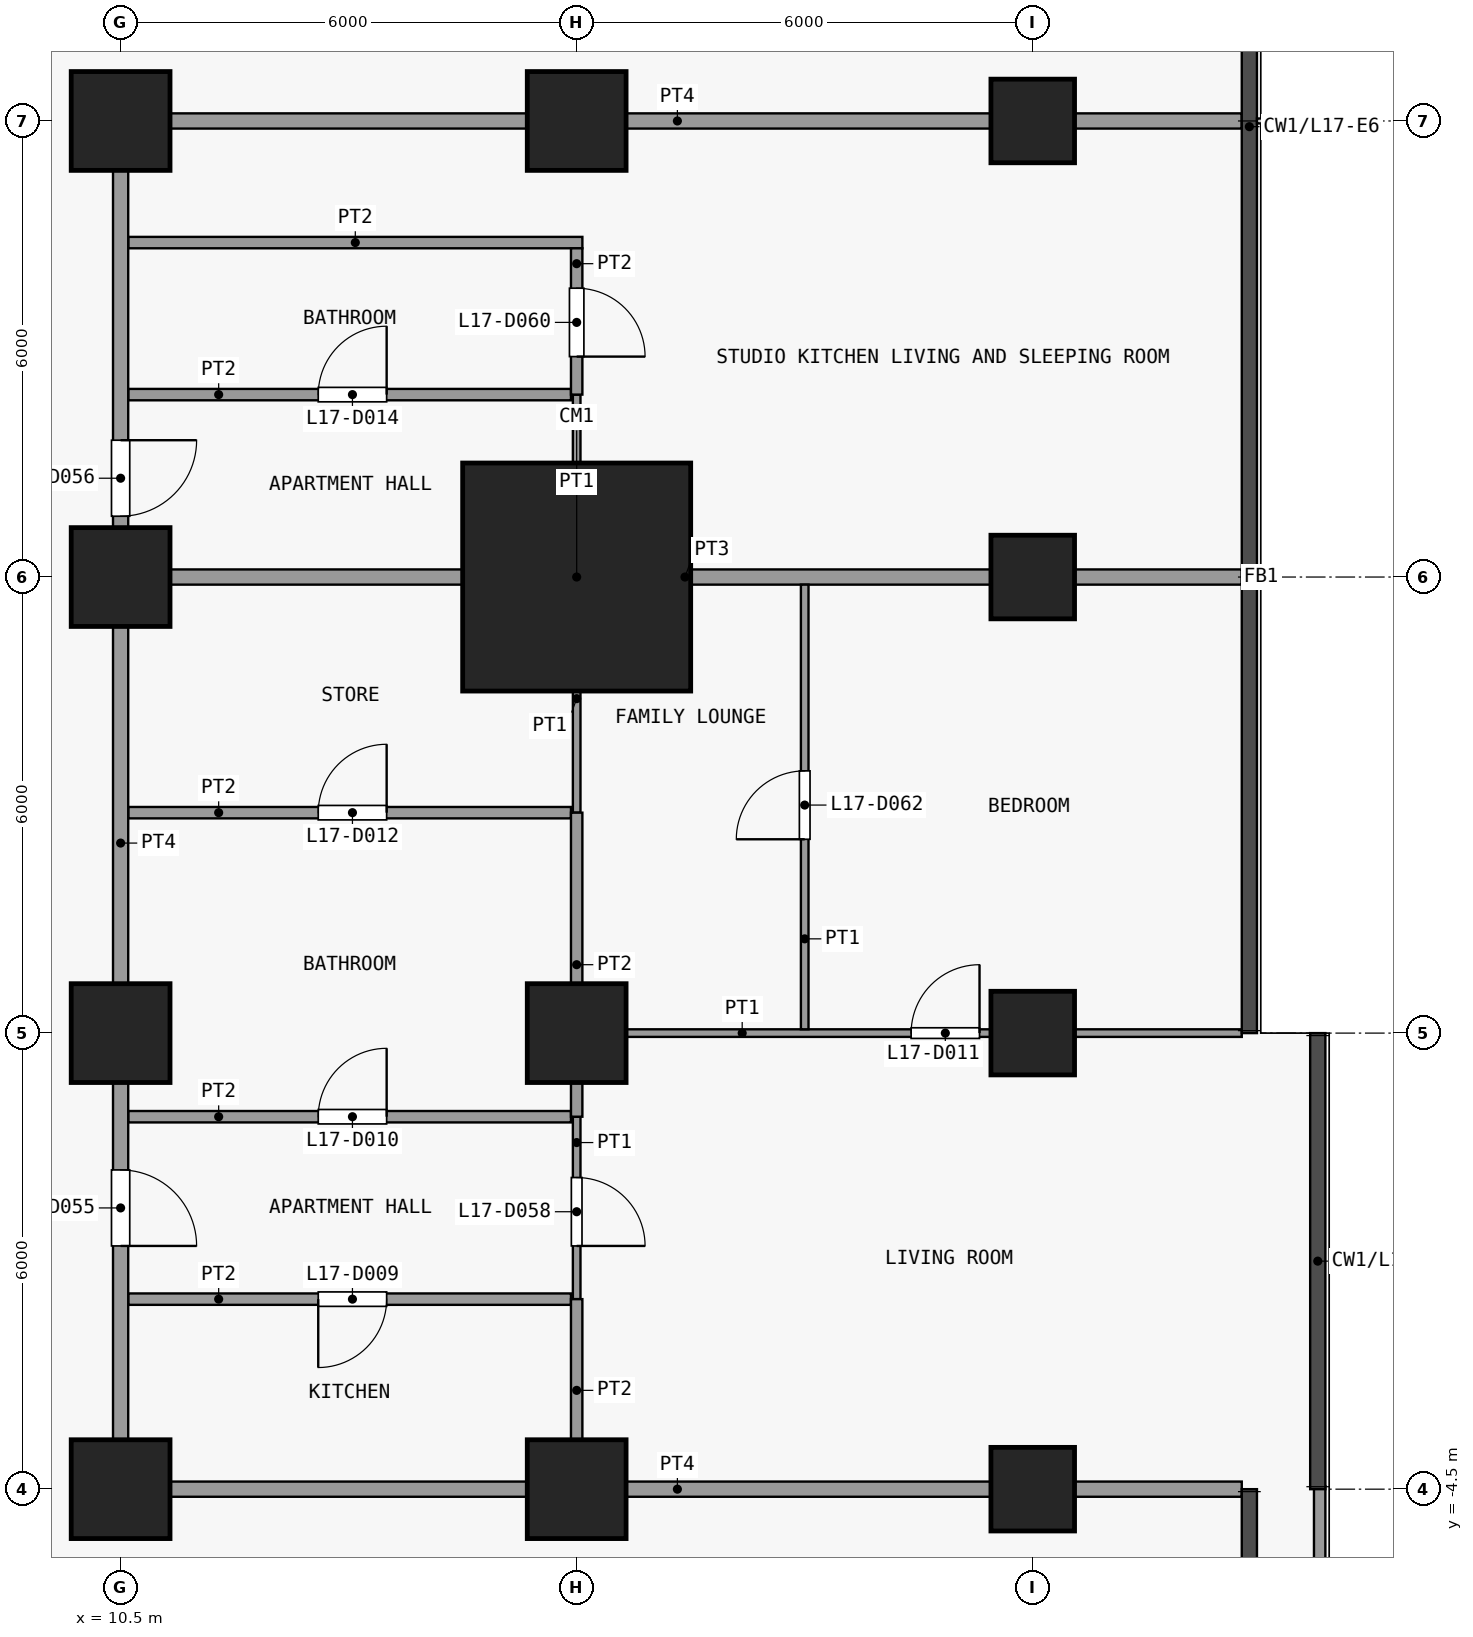
"""IFC4 building model, lengths in metres.
Left out: names, types, materials, properties, quantities, classifications, styles, units other than length and angle.
Written with IfcOpenShell. Run it as: python <this file> out.ifc"""

import sys

from ifc_helpers import new_model, si_unit, direction, frame, frame_2d, origin, origin_2d, place, context, subcontext, project, spatial, rectangle, extrude, element, fill, save


model = new_model("IFC4")
c1 = context("Model", 3, precision=1e-05, world=origin(), true_north=direction((0.0, 1.0)))
c2 = subcontext(c1, "Body", "Model", "MODEL_VIEW")
j1 = project(units=[si_unit("LENGTHUNIT", "METRE"), si_unit("PLANEANGLEUNIT", "RADIAN")], contexts=[c1])
p1 = place(None, origin())
s1 = spatial("IfcSite", under=j1, at=p1, CompositionType="ELEMENT")
p2 = place(p1, origin())
s2 = spatial("IfcBuilding", under=s1, at=p2, CompositionType="ELEMENT")
p3 = place(p2, frame((0.0, 0.0, 72.1)))
s3 = spatial("IfcBuildingStorey", under=s2, at=p3, CompositionType="ELEMENT", Elevation=72.1)
for number, where, z_axis, x_axis in (
    (1, (10.5, -4.5, 0.0), (0.0, 0.0, 1.0), (1.0, 0.0, 0.0)),
    (2, (10.5, 1.5, 0.0), (0.0, 0.0, 1.0), (1.0, 0.0, 0.0)),
    (3, (10.5, 7.5, 0.0), (0.0, 0.0, 1.0), (1.0, 0.0, 0.0)),
    (4, (10.5, 13.5, 0.0), (0.0, 0.0, 1.0), (1.0, 0.0, 0.0)),
    (5, (16.5, -4.5, 0.0), (0.0, 0.0, 1.0), (1.0, 0.0, 0.0)),
    (6, (16.5, 1.5, 0.0), (0.0, 0.0, 1.0), (1.0, 0.0, 0.0)),
):
    element("IfcColumn", number, at=place(p3, frame(where, z_axis=z_axis, x_axis=x_axis)), inside=s3, PredefinedType="COLUMN", context=c2, shape_type="SweptSolid", body=[
        extrude(rectangle(XDim=1.3, YDim=1.3, at=origin_2d()), origin(), (0.0, 0.0, 1.0), 3.6),
    ])
p4 = place(p3, frame((16.5, 7.5, 0.0), z_axis=(0.0, 0.0, 1.0), x_axis=(1.0, 0.0, 0.0)))
e7 = element("IfcColumn", 7, at=p4, inside=s3, PredefinedType="COLUMN", context=c2, shape_type="SweptSolid", body=[
    extrude(rectangle(XDim=3.0, YDim=3.0, at=origin_2d()), origin(), (0.0, 0.0, 1.0), 3.6),
])
p5 = place(p3, frame((16.5, 13.5, 0.0), z_axis=(0.0, 0.0, 1.0), x_axis=(1.0, 0.0, 0.0)))
e8 = element("IfcColumn", 8, at=p5, inside=s3, PredefinedType="COLUMN", context=c2, shape_type="SweptSolid", body=[
    extrude(rectangle(XDim=1.3, YDim=1.3, at=origin_2d()), origin(), (0.0, 0.0, 1.0), 3.6),
])
for number, where, z_axis, x_axis in (
    (9, (22.5, -4.5, 0.0), (0.0, 0.0, 1.0), (1.0, 0.0, 0.0)),
    (10, (22.5, 1.5, 0.0), (0.0, 0.0, 1.0), (1.0, 0.0, 0.0)),
    (11, (22.5, 7.5, 0.0), (0.0, 0.0, 1.0), (1.0, 0.0, 0.0)),
    (12, (22.5, 13.5, 0.0), (0.0, 0.0, 1.0), (1.0, 0.0, 0.0)),
):
    element("IfcColumn", number, at=place(p3, frame(where, z_axis=z_axis, x_axis=x_axis)), inside=s3, PredefinedType="COLUMN", context=c2, shape_type="SweptSolid", body=[
        extrude(rectangle(XDim=1.1, YDim=1.1, at=origin_2d()), origin(), (0.0, 0.0, 1.0), 3.6),
    ])
p6 = place(p3, frame((26.275, -4.46, 0.0), z_axis=(0.0, 0.0, 1.0), x_axis=(0.0, -1.0, 0.0)))
e13 = element("IfcWall", 13, at=p6, inside=s3, PredefinedType="PARAPET", context=c2, shape_type="SweptSolid", body=[
    extrude(rectangle(XDim=8.99, YDim=0.15, at=frame_2d((4.495, 0.0))), origin(), (0.0, 0.0, 1.0), 1.15),
])
p7 = place(p3, frame((10.4, -4.5, 0.0), z_axis=(0.0, 0.0, 1.0), x_axis=(1.0, 0.0, 0.0)))
e14 = element("IfcWall", 14, at=p7, inside=s3, PredefinedType="PARTITIONING", context=c2, shape_type="SweptSolid", body=[
    extrude(rectangle(XDim=14.85, YDim=0.2, at=frame_2d((7.425, 0.0))), origin(), (0.0, 0.0, 1.0), 3.15),
])
p8 = place(p3, frame((10.6, -2.0, 0.0), z_axis=(0.0, 0.0, 1.0), x_axis=(1.0, 0.0, 0.0)))
e15 = element("IfcWall", 15, at=p8, inside=s3, PredefinedType="PARTITIONING", context=c2, shape_type="SweptSolid", body=[
    extrude(rectangle(XDim=5.825, YDim=0.15, at=frame_2d((2.913, 0.0))), origin(), (0.0, 0.0, 1.0), 3.15),
])
p9 = place(p8, frame((2.5, 0.0, 0.0)))
e16 = element("IfcOpeningElement", 16, at=p9, cuts=e15, PredefinedType="OPENING", context=c2, shape_type="SweptSolid", body=[
    extrude(rectangle(XDim=0.9, YDim=2.1, at=frame_2d((0.45, 1.05))), frame((0.0, 0.085, 0.0), z_axis=(0.0, -1.0, 0.0), x_axis=(1.0, 0.0, 0.0)), (0.0, 0.0, 1.0), 0.17),
])
p10 = place(p3, frame((10.6, 0.4, 0.0), z_axis=(0.0, 0.0, 1.0), x_axis=(1.0, 0.0, 0.0)))
e17 = element("IfcWall", 17, at=p10, inside=s3, PredefinedType="PARTITIONING", context=c2, shape_type="SweptSolid", body=[
    extrude(rectangle(XDim=5.825, YDim=0.15, at=frame_2d((2.913, 0.0))), origin(), (0.0, 0.0, 1.0), 3.15),
])
p11 = place(p10, frame((2.5, 0.0, 0.0)))
e18 = element("IfcOpeningElement", 18, at=p11, cuts=e17, PredefinedType="OPENING", context=c2, shape_type="SweptSolid", body=[
    extrude(rectangle(XDim=0.9, YDim=2.1, at=frame_2d((0.45, 1.05))), frame((0.0, 0.085, 0.0), z_axis=(0.0, -1.0, 0.0), x_axis=(1.0, 0.0, 0.0)), (0.0, 0.0, 1.0), 0.17),
])
p12 = place(p3, frame((16.575, 1.5, 0.0), z_axis=(0.0, 0.0, 1.0), x_axis=(1.0, 0.0, 0.0)))
e19 = element("IfcWall", 19, at=p12, inside=s3, PredefinedType="PARTITIONING", context=c2, shape_type="SweptSolid", body=[
    extrude(rectangle(XDim=8.675, YDim=0.1, at=frame_2d((4.337, 0.0))), origin(), (0.0, 0.0, 1.0), 3.15),
])
p13 = place(p12, frame((4.325, 0.0, 0.0)))
e20 = element("IfcOpeningElement", 20, at=p13, cuts=e19, PredefinedType="OPENING", context=c2, shape_type="SweptSolid", body=[
    extrude(rectangle(XDim=0.9, YDim=2.1, at=frame_2d((0.45, 1.05))), frame((0.0, 0.06, 0.0), z_axis=(0.0, -1.0, 0.0), x_axis=(1.0, 0.0, 0.0)), (0.0, 0.0, 1.0), 0.12),
])
p14 = place(p3, frame((10.6, 4.4, 0.0), z_axis=(0.0, 0.0, 1.0), x_axis=(1.0, 0.0, 0.0)))
e21 = element("IfcWall", 21, at=p14, inside=s3, PredefinedType="PARTITIONING", context=c2, shape_type="SweptSolid", body=[
    extrude(rectangle(XDim=5.825, YDim=0.15, at=frame_2d((2.913, 0.0))), origin(), (0.0, 0.0, 1.0), 3.15),
])
p15 = place(p14, frame((2.5, 0.0, 0.0)))
e22 = element("IfcOpeningElement", 22, at=p15, cuts=e21, PredefinedType="OPENING", context=c2, shape_type="SweptSolid", body=[
    extrude(rectangle(XDim=0.9, YDim=2.1, at=frame_2d((0.45, 1.05))), frame((0.0, 0.085, 0.0), z_axis=(0.0, -1.0, 0.0), x_axis=(1.0, 0.0, 0.0)), (0.0, 0.0, 1.0), 0.17),
])
p16 = place(p3, frame((10.6, 7.5, 0.0), z_axis=(0.0, 0.0, 1.0), x_axis=(1.0, 0.0, 0.0)))
e23 = element("IfcWall", 23, at=p16, inside=s3, PredefinedType="PARTITIONING", context=c2, shape_type="SweptSolid", body=[
    extrude(rectangle(XDim=14.65, YDim=0.2, at=frame_2d((7.325, 0.0))), origin(), (0.0, 0.0, 1.0), 3.15),
])
p17 = place(p3, frame((10.6, 9.9, 0.0), z_axis=(0.0, 0.0, 1.0), x_axis=(1.0, 0.0, 0.0)))
e24 = element("IfcWall", 24, at=p17, inside=s3, PredefinedType="PARTITIONING", context=c2, shape_type="SweptSolid", body=[
    extrude(rectangle(XDim=5.825, YDim=0.15, at=frame_2d((2.913, 0.0))), origin(), (0.0, 0.0, 1.0), 3.15),
])
p18 = place(p17, frame((2.5, 0.0, 0.0)))
e25 = element("IfcOpeningElement", 25, at=p18, cuts=e24, PredefinedType="OPENING", context=c2, shape_type="SweptSolid", body=[
    extrude(rectangle(XDim=0.9, YDim=2.1, at=frame_2d((0.45, 1.05))), frame((0.0, 0.085, 0.0), z_axis=(0.0, -1.0, 0.0), x_axis=(1.0, 0.0, 0.0)), (0.0, 0.0, 1.0), 0.17),
])
p19 = place(p3, frame((10.6, 11.9, 0.0), z_axis=(0.0, 0.0, 1.0), x_axis=(1.0, 0.0, 0.0)))
e26 = element("IfcWall", 26, at=p19, inside=s3, PredefinedType="PARTITIONING", context=c2, shape_type="SweptSolid", body=[
    extrude(rectangle(XDim=5.975, YDim=0.15, at=frame_2d((2.987, 0.0))), origin(), (0.0, 0.0, 1.0), 3.15),
])
p20 = place(p3, frame((10.4, 13.5, 0.0), z_axis=(0.0, 0.0, 1.0), x_axis=(1.0, 0.0, 0.0)))
e27 = element("IfcWall", 27, at=p20, inside=s3, PredefinedType="PARTITIONING", context=c2, shape_type="SweptSolid", body=[
    extrude(rectangle(XDim=14.85, YDim=0.2, at=frame_2d((7.425, 0.0))), origin(), (0.0, 0.0, 1.0), 3.15),
])
p21 = place(p3, frame((10.5, -4.4, 0.0), z_axis=(0.0, 0.0, 1.0), x_axis=(0.0, 1.0, 0.0)))
e28 = element("IfcWall", 28, at=p21, inside=s3, PredefinedType="PARTITIONING", context=c2, shape_type="SweptSolid", body=[
    extrude(rectangle(XDim=17.8, YDim=0.2, at=frame_2d((8.9, 0.0))), origin(), (0.0, 0.0, 1.0), 3.15),
])
p22 = place(p21, frame((3.1, 0.0, 0.0)))
e29 = element("IfcOpeningElement", 29, at=p22, cuts=e28, PredefinedType="OPENING", context=c2, shape_type="SweptSolid", body=[
    extrude(rectangle(XDim=1.0, YDim=2.1, at=frame_2d((0.5, 1.05))), frame((0.0, 0.11, 0.0), z_axis=(0.0, -1.0, 0.0), x_axis=(1.0, 0.0, 0.0)), (0.0, 0.0, 1.0), 0.22),
])
p23 = place(p21, frame((12.7, 0.0, 0.0)))
e30 = element("IfcOpeningElement", 30, at=p23, cuts=e28, PredefinedType="OPENING", context=c2, shape_type="SweptSolid", body=[
    extrude(rectangle(XDim=1.0, YDim=2.1, at=frame_2d((0.5, 1.05))), frame((0.0, 0.11, 0.0), z_axis=(0.0, -1.0, 0.0), x_axis=(1.0, 0.0, 0.0)), (0.0, 0.0, 1.0), 0.22),
])
p24 = place(p3, frame((16.5, -2.0, 0.0), z_axis=(0.0, 0.0, 1.0), x_axis=(0.0, 1.0, 0.0)))
e31 = element("IfcWall", 31, at=p24, inside=s3, PredefinedType="PARTITIONING", context=c2, shape_type="SweptSolid", body=[
    extrude(rectangle(XDim=2.4, YDim=0.1, at=frame_2d((1.2, 0.0))), origin(), (0.0, 0.0, 1.0), 3.15),
])
p25 = place(p24, frame((0.7, 0.0, 0.0)))
e32 = element("IfcOpeningElement", 32, at=p25, cuts=e31, PredefinedType="OPENING", context=c2, shape_type="SweptSolid", body=[
    extrude(rectangle(XDim=0.9, YDim=2.1, at=frame_2d((0.45, 1.05))), frame((0.0, 0.06, 0.0), z_axis=(0.0, -1.0, 0.0), x_axis=(1.0, 0.0, 0.0)), (0.0, 0.0, 1.0), 0.12),
])
p26 = place(p3, frame((16.5, 4.4, 0.0), z_axis=(0.0, 0.0, 1.0), x_axis=(0.0, 1.0, 0.0)))
e33 = element("IfcWall", 33, at=p26, inside=s3, PredefinedType="PARTITIONING", context=c2, shape_type="SweptSolid", body=[
    extrude(rectangle(XDim=3.0, YDim=0.1, at=frame_2d((1.5, 0.0))), origin(), (0.0, 0.0, 1.0), 3.15),
])
p27 = place(p3, frame((16.5, 7.6, 0.0), z_axis=(0.0, 0.0, 1.0), x_axis=(0.0, 1.0, 0.0)))
e34 = element("IfcWall", 34, at=p27, inside=s3, PredefinedType="PARTITIONING", context=c2, shape_type="SweptSolid", body=[
    extrude(rectangle(XDim=2.3, YDim=0.1, at=frame_2d((1.15, 0.0))), origin(), (0.0, 0.0, 1.0), 3.15),
])
p28 = place(p3, frame((16.5, -4.4, 0.0), z_axis=(0.0, 0.0, 1.0), x_axis=(0.0, 1.0, 0.0)))
e35 = element("IfcWall", 35, at=p28, inside=s3, PredefinedType="PARTITIONING", context=c2, shape_type="SweptSolid", body=[
    extrude(rectangle(XDim=2.4, YDim=0.15, at=frame_2d((1.2, 0.0))), origin(), (0.0, 0.0, 1.0), 3.15),
])
p29 = place(p3, frame((16.5, 0.4, 0.0), z_axis=(0.0, 0.0, 1.0), x_axis=(0.0, 1.0, 0.0)))
e36 = element("IfcWall", 36, at=p29, inside=s3, PredefinedType="PARTITIONING", context=c2, shape_type="SweptSolid", body=[
    extrude(rectangle(XDim=4.0, YDim=0.15, at=frame_2d((2.0, 0.0))), origin(), (0.0, 0.0, 1.0), 3.15),
])
p30 = place(p3, frame((16.5, 9.9, 0.0), z_axis=(0.0, 0.0, 1.0), x_axis=(0.0, 1.0, 0.0)))
e37 = element("IfcWall", 37, at=p30, inside=s3, PredefinedType="PARTITIONING", context=c2, shape_type="SweptSolid", body=[
    extrude(rectangle(XDim=1.925, YDim=0.15, at=frame_2d((0.962, 0.0))), origin(), (0.0, 0.0, 1.0), 3.15),
])
p31 = place(p30, frame((0.5, 0.0, 0.0)))
e38 = element("IfcOpeningElement", 38, at=p31, cuts=e37, PredefinedType="OPENING", context=c2, shape_type="SweptSolid", body=[
    extrude(rectangle(XDim=0.9, YDim=2.1, at=frame_2d((0.45, 1.05))), frame((0.0, 0.085, 0.0), z_axis=(0.0, -1.0, 0.0), x_axis=(1.0, 0.0, 0.0)), (0.0, 0.0, 1.0), 0.17),
])
p32 = place(p3, frame((19.5, 1.55, 0.0), z_axis=(0.0, 0.0, 1.0), x_axis=(0.0, 1.0, 0.0)))
e39 = element("IfcWall", 39, at=p32, inside=s3, PredefinedType="PARTITIONING", context=c2, shape_type="SweptSolid", body=[
    extrude(rectangle(XDim=5.85, YDim=0.1, at=frame_2d((2.925, 0.0))), origin(), (0.0, 0.0, 1.0), 3.15),
])
p33 = place(p32, frame((2.5, 0.0, 0.0)))
e40 = element("IfcOpeningElement", 40, at=p33, cuts=e39, PredefinedType="OPENING", context=c2, shape_type="SweptSolid", body=[
    extrude(rectangle(XDim=0.9, YDim=2.1, at=frame_2d((0.45, 1.05))), frame((0.0, 0.06, 0.0), z_axis=(0.0, -1.0, 0.0), x_axis=(1.0, 0.0, 0.0)), (0.0, 0.0, 1.0), 0.12),
])
p34 = place(p9, origin())
e41 = element("IfcDoor", 41, at=p34, inside=s3, OperationType="SINGLE_SWING_LEFT", PredefinedType="DOOR", context=c2, shape_type="SweptSolid", body=[
    extrude(rectangle(XDim=0.9, YDim=2.1, at=frame_2d((0.45, 1.05))), frame((0.0, 0.025, 0.0), z_axis=(0.0, -1.0, 0.0), x_axis=(1.0, 0.0, 0.0)), (0.0, 0.0, 1.0), 0.05),
])
fill(e16, e41)
p35 = place(p11, origin())
e42 = element("IfcDoor", 42, at=p35, inside=s3, OperationType="SINGLE_SWING_LEFT", PredefinedType="DOOR", context=c2, shape_type="SweptSolid", body=[
    extrude(rectangle(XDim=0.9, YDim=2.1, at=frame_2d((0.45, 1.05))), frame((0.0, 0.025, 0.0), z_axis=(0.0, -1.0, 0.0), x_axis=(1.0, 0.0, 0.0)), (0.0, 0.0, 1.0), 0.05),
])
fill(e18, e42)
p36 = place(p13, origin())
e43 = element("IfcDoor", 43, at=p36, inside=s3, OperationType="SINGLE_SWING_LEFT", PredefinedType="DOOR", context=c2, shape_type="SweptSolid", body=[
    extrude(rectangle(XDim=0.9, YDim=2.1, at=frame_2d((0.45, 1.05))), frame((0.0, 0.025, 0.0), z_axis=(0.0, -1.0, 0.0), x_axis=(1.0, 0.0, 0.0)), (0.0, 0.0, 1.0), 0.05),
])
fill(e20, e43)
p37 = place(p15, origin())
e44 = element("IfcDoor", 44, at=p37, inside=s3, OperationType="SINGLE_SWING_LEFT", PredefinedType="DOOR", context=c2, shape_type="SweptSolid", body=[
    extrude(rectangle(XDim=0.9, YDim=2.1, at=frame_2d((0.45, 1.05))), frame((0.0, 0.025, 0.0), z_axis=(0.0, -1.0, 0.0), x_axis=(1.0, 0.0, 0.0)), (0.0, 0.0, 1.0), 0.05),
])
fill(e22, e44)
p38 = place(p18, origin())
e45 = element("IfcDoor", 45, at=p38, inside=s3, OperationType="SINGLE_SWING_LEFT", PredefinedType="DOOR", context=c2, shape_type="SweptSolid", body=[
    extrude(rectangle(XDim=0.9, YDim=2.1, at=frame_2d((0.45, 1.05))), frame((0.0, 0.025, 0.0), z_axis=(0.0, -1.0, 0.0), x_axis=(1.0, 0.0, 0.0)), (0.0, 0.0, 1.0), 0.05),
])
fill(e25, e45)
p39 = place(p22, origin())
e46 = element("IfcDoor", 46, at=p39, inside=s3, OperationType="SINGLE_SWING_LEFT", PredefinedType="DOOR", context=c2, shape_type="SweptSolid", body=[
    extrude(rectangle(XDim=1.0, YDim=2.1, at=frame_2d((0.5, 1.05))), frame((0.0, 0.025, 0.0), z_axis=(0.0, -1.0, 0.0), x_axis=(1.0, 0.0, 0.0)), (0.0, 0.0, 1.0), 0.05),
])
fill(e29, e46)
p40 = place(p23, origin())
e47 = element("IfcDoor", 47, at=p40, inside=s3, OperationType="SINGLE_SWING_RIGHT", PredefinedType="DOOR", context=c2, shape_type="SweptSolid", body=[
    extrude(rectangle(XDim=1.0, YDim=2.1, at=frame_2d((0.5, 1.05))), frame((0.0, 0.025, 0.0), z_axis=(0.0, -1.0, 0.0), x_axis=(1.0, 0.0, 0.0)), (0.0, 0.0, 1.0), 0.05),
])
fill(e30, e47)
p41 = place(p25, origin())
e48 = element("IfcDoor", 48, at=p41, inside=s3, OperationType="SINGLE_SWING_LEFT", PredefinedType="DOOR", context=c2, shape_type="SweptSolid", body=[
    extrude(rectangle(XDim=0.9, YDim=2.1, at=frame_2d((0.45, 1.05))), frame((0.0, 0.025, 0.0), z_axis=(0.0, -1.0, 0.0), x_axis=(1.0, 0.0, 0.0)), (0.0, 0.0, 1.0), 0.05),
])
fill(e32, e48)
p42 = place(p31, origin())
e49 = element("IfcDoor", 49, at=p42, inside=s3, OperationType="SINGLE_SWING_LEFT", PredefinedType="DOOR", context=c2, shape_type="SweptSolid", body=[
    extrude(rectangle(XDim=0.9, YDim=2.1, at=frame_2d((0.45, 1.05))), frame((0.0, 0.025, 0.0), z_axis=(0.0, -1.0, 0.0), x_axis=(1.0, 0.0, 0.0)), (0.0, 0.0, 1.0), 0.05),
])
fill(e38, e49)
p43 = place(p33, origin())
e50 = element("IfcDoor", 50, at=p43, inside=s3, OperationType="SINGLE_SWING_RIGHT", PredefinedType="DOOR", context=c2, shape_type="SweptSolid", body=[
    extrude(rectangle(XDim=0.9, YDim=2.1, at=frame_2d((0.45, 1.05))), frame((0.0, 0.025, 0.0), z_axis=(0.0, -1.0, 0.0), x_axis=(1.0, 0.0, 0.0)), (0.0, 0.0, 1.0), 0.05),
])
fill(e40, e50)
save(model, sys.argv[1])
